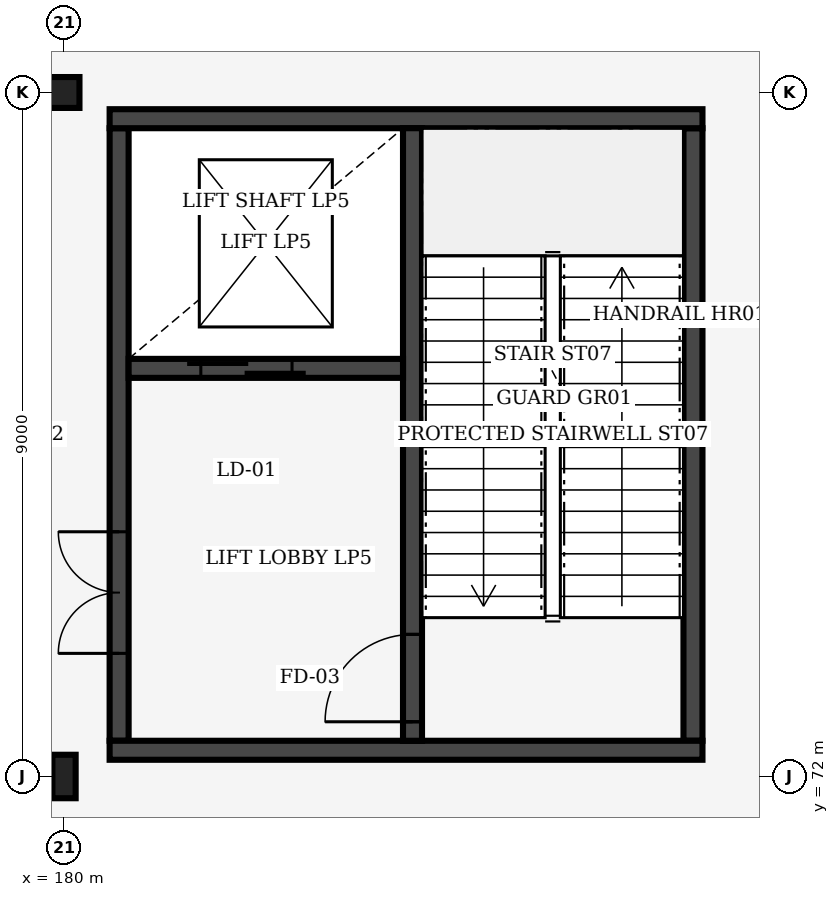
"""IFC4 building model, lengths in metres.
Left out: names, types, materials, properties, quantities, classifications, styles, units other than length and angle.
Written with IfcOpenShell. Run it as: python <this file> out.ifc"""

import sys

from ifc_helpers import new_model, si_unit, direction, frame, frame_2d, origin, origin_2d, place, context, subcontext, project, spatial, rectangle, hollow_circle, i_section, extrude, element, fill, save


model = new_model("IFC4")
c1 = context("Model", 3, precision=1e-05, world=origin(), true_north=direction((0.0, 1.0)))
c2 = subcontext(c1, "Body", "Model", "MODEL_VIEW")
j1 = project(units=[si_unit("LENGTHUNIT", "METRE"), si_unit("PLANEANGLEUNIT", "RADIAN")], contexts=[c1])
p1 = place(None, origin())
s1 = spatial("IfcSite", under=j1, at=p1, CompositionType="ELEMENT")
p2 = place(p1, origin())
s2 = spatial("IfcBuilding", under=s1, at=p2, CompositionType="ELEMENT")
p3 = place(p2, frame((0.0, 0.0, 6.0)))
s3 = spatial("IfcBuildingStorey", under=s2, at=p3, CompositionType="ELEMENT", Elevation=6.0)
p4 = place(p3, frame((180.0, 72.0, 0.0), z_axis=(0.0, 0.0, 1.0), x_axis=(1.0, 0.0, 0.0)))
e1 = element("IfcColumn", 1, at=p4, inside=s3, PredefinedType="COLUMN", context=c2, shape_type="SweptSolid", body=[
    extrude(i_section(OverallWidth=0.306, OverallDepth=0.572, WebThickness=0.021, FlangeThickness=0.04, FilletRadius=0.027, at=origin_2d()), origin(), (0.0, 0.0, 1.0), 6.0),
])
p5 = place(p3, frame((180.0, 81.0, 0.0), z_axis=(0.0, 0.0, 1.0), x_axis=(1.0, 0.0, 0.0)))
e2 = element("IfcColumn", 2, at=p5, inside=s3, PredefinedType="COLUMN", context=c2, shape_type="SweptSolid", body=[
    extrude(hollow_circle(Radius=0.203, WallThickness=0.016, at=origin_2d()), origin(), (0.0, 0.0, 1.0), 6.0),
])
p6 = place(p3, frame((180.725, 72.47, 0.0), z_axis=(0.0, 0.0, 1.0), x_axis=(0.0, 1.0, 0.0)))
e3 = element("IfcWall", 3, at=p6, inside=s3, PredefinedType="SHEAR", context=c2, shape_type="SweptSolid", body=[
    extrude(rectangle(XDim=8.06, YDim=0.25, at=frame_2d((4.03, 0.0))), origin(), (0.0, 0.0, 1.0), 5.64),
])
p7 = place(p6, frame((1.15, 0.0, 0.0)))
e4 = element("IfcOpeningElement", 4, at=p7, cuts=e3, PredefinedType="OPENING", context=c2, shape_type="SweptSolid", body=[
    extrude(rectangle(XDim=1.6, YDim=2.2, at=frame_2d((0.8, 1.1))), frame((0.0, 0.135, 0.0), z_axis=(0.0, -1.0, 0.0), x_axis=(1.0, 0.0, 0.0)), (0.0, 0.0, 1.0), 0.27),
])
p8 = place(p3, frame((188.275, 72.47, 0.0), z_axis=(0.0, 0.0, 1.0), x_axis=(0.0, 1.0, 0.0)))
e5 = element("IfcWall", 5, at=p8, inside=s3, PredefinedType="SHEAR", context=c2, shape_type="SweptSolid", body=[
    extrude(rectangle(XDim=8.06, YDim=0.25, at=frame_2d((4.03, 0.0))), origin(), (0.0, 0.0, 1.0), 5.64),
])
for number, where, z_axis, x_axis in (
    (6, (180.6, 72.345, 0.0), (0.0, 0.0, 1.0), (1.0, 0.0, 0.0)),
    (7, (180.6, 80.655, 0.0), (0.0, 0.0, 1.0), (1.0, 0.0, 0.0)),
):
    element("IfcWall", number, at=place(p3, frame(where, z_axis=z_axis, x_axis=x_axis)), inside=s3, PredefinedType="SHEAR", context=c2, shape_type="SweptSolid", body=[
        extrude(rectangle(XDim=7.8, YDim=0.25, at=frame_2d((3.9, 0.0))), origin(), (0.0, 0.0, 1.0), 5.64),
    ])
p9 = place(p3, frame((184.585, 72.47, 0.0), z_axis=(0.0, 0.0, 1.0), x_axis=(0.0, 1.0, 0.0)))
e8 = element("IfcWall", 8, at=p9, inside=s3, PredefinedType="SHEAR", context=c2, shape_type="SweptSolid", body=[
    extrude(rectangle(XDim=8.06, YDim=0.25, at=frame_2d((4.03, 0.0))), origin(), (0.0, 0.0, 1.0), 5.64),
])
p10 = place(p9, frame((0.25, 0.0, 0.0)))
e9 = element("IfcOpeningElement", 9, at=p10, cuts=e8, PredefinedType="OPENING", context=c2, shape_type="SweptSolid", body=[
    extrude(rectangle(XDim=1.15, YDim=2.15, at=frame_2d((0.575, 1.075))), frame((0.0, 0.135, 0.0), z_axis=(0.0, -1.0, 0.0), x_axis=(1.0, 0.0, 0.0)), (0.0, 0.0, 1.0), 0.27),
])
p11 = place(p3, frame((180.85, 77.37, 0.0), z_axis=(0.0, 0.0, 1.0), x_axis=(1.0, 0.0, 0.0)))
e10 = element("IfcWall", 10, at=p11, inside=s3, PredefinedType="SHEAR", context=c2, shape_type="SweptSolid", body=[
    extrude(rectangle(XDim=3.61, YDim=0.25, at=frame_2d((1.805, 0.0))), origin(), (0.0, 0.0, 1.0), 5.64),
])
p12 = place(p11, frame((0.95, 0.0, 0.0)))
e11 = element("IfcOpeningElement", 11, at=p12, cuts=e10, PredefinedType="OPENING", context=c2, shape_type="SweptSolid", body=[
    extrude(rectangle(XDim=1.2, YDim=2.2, at=frame_2d((0.6, 1.1))), frame((0.0, 0.135, 0.0), z_axis=(0.0, -1.0, 0.0), x_axis=(1.0, 0.0, 0.0)), (0.0, 0.0, 1.0), 0.27),
])
p13 = place(p10, origin())
e12 = element("IfcDoor", 12, at=p13, inside=s3, OperationType="SINGLE_SWING_LEFT", PredefinedType="DOOR", context=c2, shape_type="SweptSolid", body=[
    extrude(rectangle(XDim=1.15, YDim=2.15, at=frame_2d((0.575, 1.075))), frame((0.0, 0.025, 0.0), z_axis=(0.0, -1.0, 0.0), x_axis=(1.0, 0.0, 0.0)), (0.0, 0.0, 1.0), 0.05),
])
fill(e9, e12)
p14 = place(p12, origin())
e13 = element("IfcDoor", 13, at=p14, inside=s3, OperationType="DOUBLE_DOOR_SLIDING", PredefinedType="DOOR", context=c2, shape_type="SweptSolid", body=[
    extrude(rectangle(XDim=1.2, YDim=2.2, at=frame_2d((0.6, 1.1))), frame((0.0, 0.025, 0.0), z_axis=(0.0, -1.0, 0.0), x_axis=(1.0, 0.0, 0.0)), (0.0, 0.0, 1.0), 0.05),
])
fill(e11, e13)
p15 = place(p7, origin())
e14 = element("IfcDoor", 14, at=p15, inside=s3, OperationType="DOUBLE_DOOR_SINGLE_SWING", PredefinedType="DOOR", context=c2, shape_type="SweptSolid", body=[
    extrude(rectangle(XDim=1.6, YDim=2.2, at=frame_2d((0.8, 1.1))), frame((0.0, 0.025, 0.0), z_axis=(0.0, -1.0, 0.0), x_axis=(1.0, 0.0, 0.0)), (0.0, 0.0, 1.0), 0.05),
])
fill(e4, e14)
save(model, sys.argv[1])
